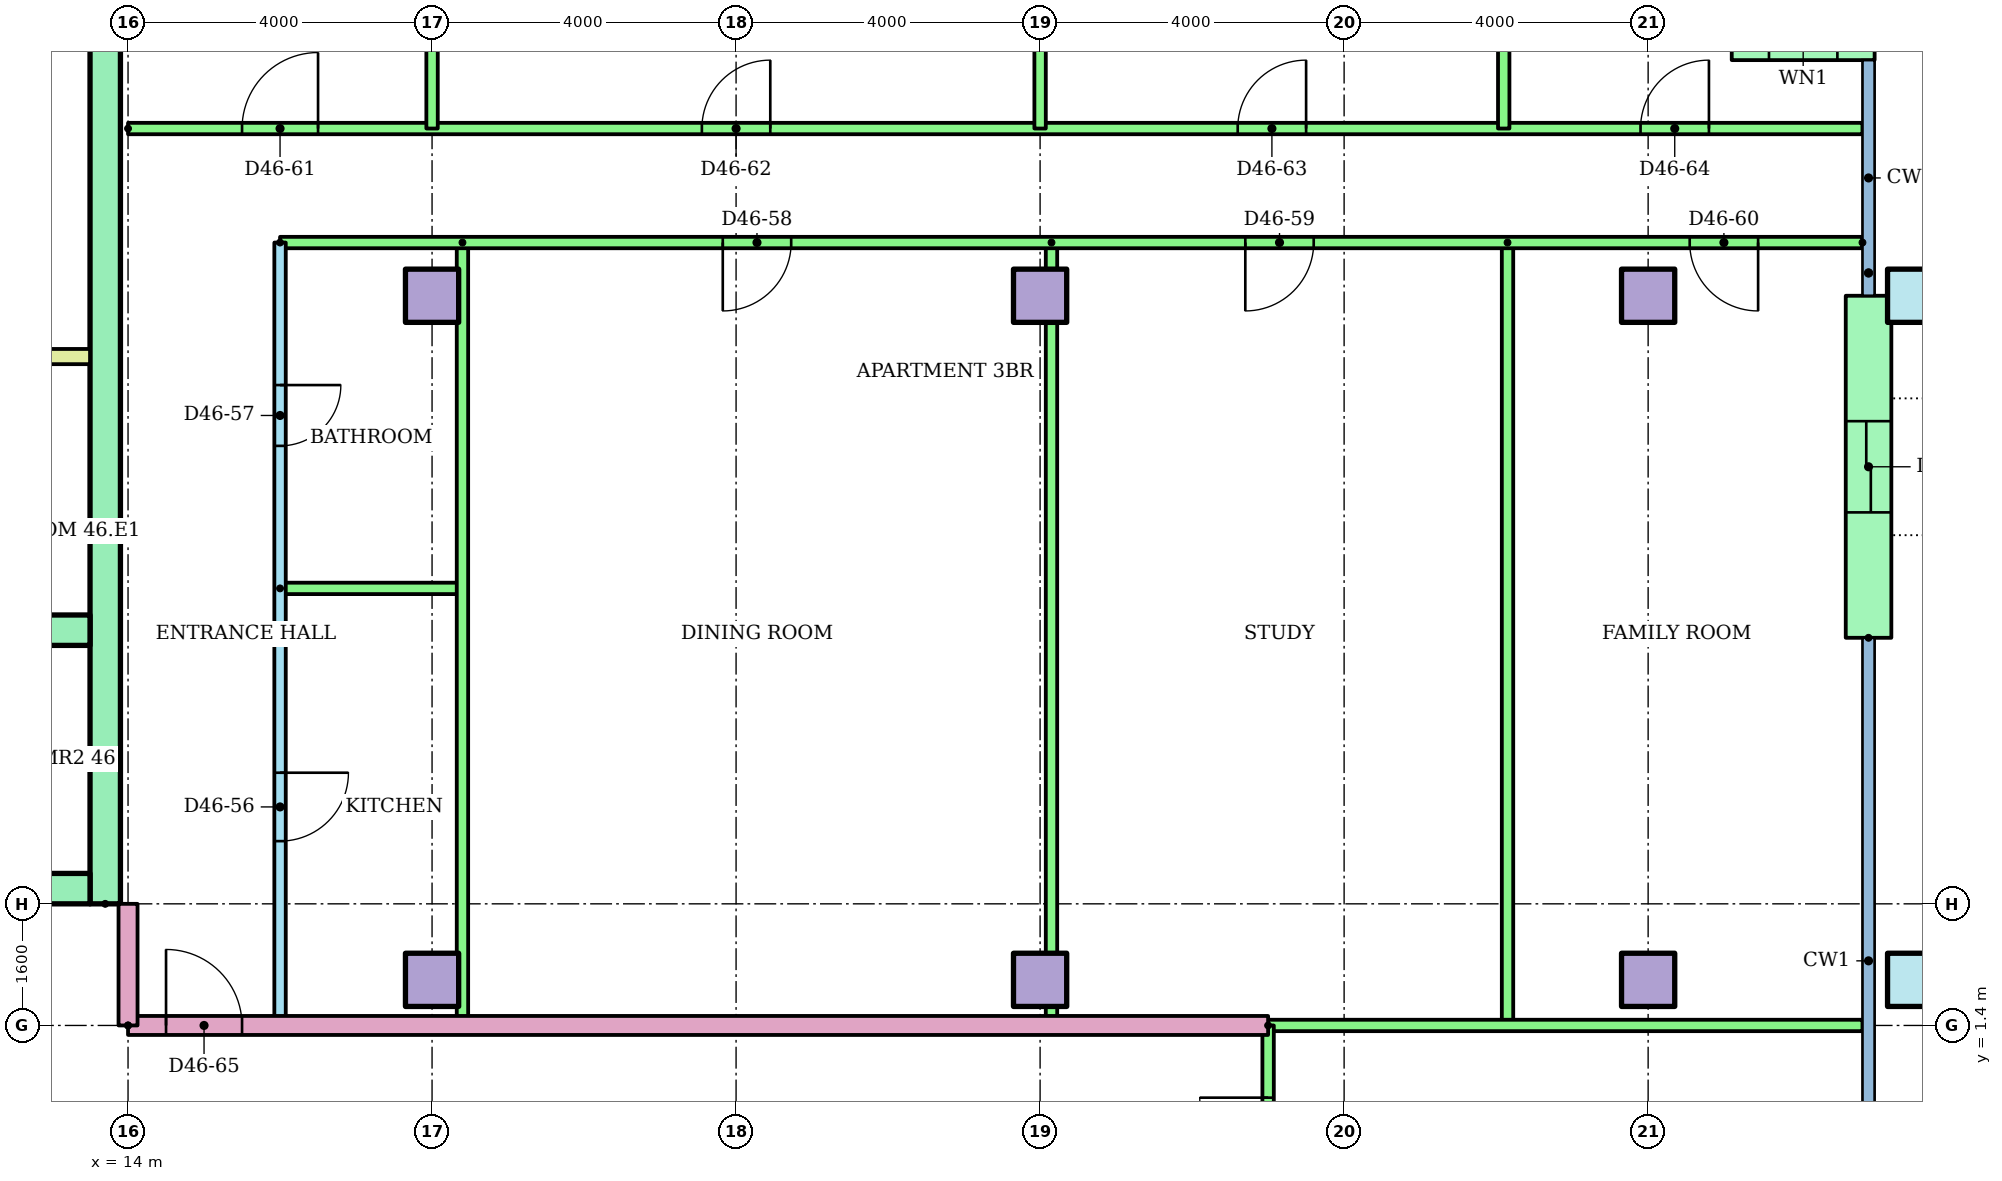
"""IFC4 building model, lengths in metres.
Left out: names, types, materials, properties, quantities, classifications, styles, units other than length and angle.
Written with IfcOpenShell. Run it as: python <this file> out.ifc"""

import sys

from ifc_helpers import new_model, si_unit, direction, frame, frame_2d, origin, origin_2d, place, context, subcontext, project, spatial, rectangle, hollow_rectangle, extrude, element, fill, save


model = new_model("IFC4")
c1 = context("Model", 3, precision=1e-05, world=origin(), true_north=direction((0.0, 1.0)))
c2 = subcontext(c1, "Body", "Model", "MODEL_VIEW")
j1 = project(units=[si_unit("LENGTHUNIT", "METRE"), si_unit("PLANEANGLEUNIT", "RADIAN")], contexts=[c1])
p1 = place(None, origin())
s1 = spatial("IfcSite", under=j1, at=p1, CompositionType="ELEMENT")
p2 = place(p1, origin())
s2 = spatial("IfcBuilding", under=s1, at=p2, CompositionType="ELEMENT")
p3 = place(p2, frame((0.0, 0.0, 178.1)))
s3 = spatial("IfcBuildingStorey", under=s2, at=p3, CompositionType="ELEMENT", Elevation=178.1)
for number, where in (
    (1, (18.0, 2.0, 0.0)),
    (2, (26.0, 2.0, 0.0)),
    (3, (34.0, 2.0, 0.0)),
):
    element("IfcColumn", number, at=place(p3, frame(where)), inside=s3, PredefinedType="COLUMN", context=c2, shape_type="SweptSolid", body=[
        extrude(rectangle(XDim=0.7, YDim=0.7, at=origin_2d()), origin(), (0.0, 0.0, 1.0), 3.2),
    ])
p4 = place(p3, frame((37.5, 2.0, 0.0)))
e4 = element("IfcColumn", 4, at=p4, inside=s3, PredefinedType="COLUMN", context=c2, shape_type="SweptSolid", body=[
    extrude(hollow_rectangle(XDim=0.7, YDim=0.7, WallThickness=0.036, at=origin_2d()), origin(), (0.0, 0.0, 1.0), 3.2),
])
for number, where in (
    (5, (18.0, 11.0, 0.0)),
    (6, (26.0, 11.0, 0.0)),
    (7, (34.0, 11.0, 0.0)),
):
    element("IfcColumn", number, at=place(p3, frame(where)), inside=s3, PredefinedType="COLUMN", context=c2, shape_type="SweptSolid", body=[
        extrude(rectangle(XDim=0.7, YDim=0.7, at=origin_2d()), origin(), (0.0, 0.0, 1.0), 3.2),
    ])
p5 = place(p3, frame((37.5, 11.0, 0.0)))
e8 = element("IfcColumn", 8, at=p5, inside=s3, PredefinedType="COLUMN", context=c2, shape_type="SweptSolid", body=[
    extrude(hollow_rectangle(XDim=0.7, YDim=0.7, WallThickness=0.036, at=origin_2d()), origin(), (0.0, 0.0, 1.0), 3.2),
])
p6 = place(p3, frame((36.98, 14.4, 0.0), z_axis=(0.0, 0.0, 1.0), x_axis=(-1.0, 0.0, 0.0)))
e9 = element("IfcWall", 9, at=p6, inside=s3, PredefinedType="STANDARD", context=c2, shape_type="SweptSolid", body=[
    extrude(rectangle(XDim=1.88, YDim=0.6, at=frame_2d((0.94, 0.0))), origin(), (0.0, 0.0, 1.0), 2.92),
])
p7 = place(p6, frame((0.49, 0.0, 0.9)))
e10 = element("IfcOpeningElement", 10, at=p7, cuts=e9, PredefinedType="OPENING", context=c2, shape_type="SweptSolid", body=[
    extrude(rectangle(XDim=0.9, YDim=1.5, at=frame_2d((0.45, 0.75))), frame((0.0, 0.31, 0.0), z_axis=(0.0, -1.0, 0.0), x_axis=(1.0, 0.0, 0.0)), (0.0, 0.0, 1.0), 0.62),
])
p8 = place(p3, frame((36.9, 6.5, 0.0), z_axis=(0.0, 0.0, 1.0), x_axis=(0.0, 1.0, 0.0)))
e11 = element("IfcWall", 11, at=p8, inside=s3, PredefinedType="STANDARD", context=c2, shape_type="SweptSolid", body=[
    extrude(rectangle(XDim=4.5, YDim=0.6, at=frame_2d((2.25, 0.0))), origin(), (0.0, 0.0, 1.0), 2.92),
])
p9 = place(p8, frame((1.65, 0.0, 0.0)))
e12 = element("IfcOpeningElement", 12, at=p9, cuts=e11, PredefinedType="OPENING", context=c2, shape_type="SweptSolid", body=[
    extrude(rectangle(XDim=1.2, YDim=2.1, at=frame_2d((0.6, 1.05))), frame((0.0, 0.31, 0.0), z_axis=(0.0, -1.0, 0.0), x_axis=(1.0, 0.0, 0.0)), (0.0, 0.0, 1.0), 0.62),
])
p10 = place(p3, frame((13.7, 3.0, 0.0), z_axis=(0.0, 0.0, 1.0), x_axis=(0.0, 1.0, 0.0)))
e13 = element("IfcWall", 13, at=p10, inside=s3, PredefinedType="SHEAR", context=c2, shape_type="SweptSolid", body=[
    extrude(rectangle(XDim=17.0, YDim=0.4, at=frame_2d((8.5, 0.0))), origin(), (0.0, 0.0, 1.0), 2.92),
])
p11 = place(p3, frame((-13.5, 3.2, 0.0)))
e14 = element("IfcWall", 14, at=p11, inside=s3, PredefinedType="SHEAR", context=c2, shape_type="SweptSolid", body=[
    extrude(rectangle(XDim=27.0, YDim=0.4, at=frame_2d((13.5, 0.0))), origin(), (0.0, 0.0, 1.0), 2.92),
])
p12 = place(p11, frame((22.083, 0.0, 0.0)))
e15 = element("IfcOpeningElement", 15, at=p12, cuts=e14, PredefinedType="OPENING", context=c2, shape_type="SweptSolid", body=[
    extrude(rectangle(XDim=1.1, YDim=2.1, at=frame_2d((0.55, 1.05))), frame((0.0, 0.21, 0.0), z_axis=(0.0, -1.0, 0.0), x_axis=(1.0, 0.0, 0.0)), (0.0, 0.0, 1.0), 0.42),
])
p13 = place(p11, frame((25.128, 0.0, 0.0)))
e16 = element("IfcOpeningElement", 16, at=p13, cuts=e14, PredefinedType="OPENING", context=c2, shape_type="SweptSolid", body=[
    extrude(rectangle(XDim=1.1, YDim=2.1, at=frame_2d((0.55, 1.05))), frame((0.0, 0.21, 0.0), z_axis=(0.0, -1.0, 0.0), x_axis=(1.0, 0.0, 0.0)), (0.0, 0.0, 1.0), 0.42),
])
p14 = place(p11, frame((12.6, 0.0, 0.0)))
e17 = element("IfcOpeningElement", 17, at=p14, cuts=e14, PredefinedType="OPENING", context=c2, shape_type="SweptSolid", body=[
    extrude(rectangle(XDim=1.8, YDim=2.1, at=frame_2d((0.9, 1.05))), frame((0.0, 0.21, 0.0), z_axis=(0.0, -1.0, 0.0), x_axis=(1.0, 0.0, 0.0)), (0.0, 0.0, 1.0), 0.42),
])
p15 = place(p3, frame((1.522, 6.6, 0.0)))
e18 = element("IfcWall", 18, at=p15, inside=s3, PredefinedType="SHEAR", context=c2, shape_type="SweptSolid", body=[
    extrude(rectangle(XDim=11.978, YDim=0.4, at=frame_2d((5.989, 0.0))), origin(), (0.0, 0.0, 1.0), 2.92),
])
p16 = place(p15, frame((1.022, 0.0, 0.0)))
e19 = element("IfcOpeningElement", 19, at=p16, cuts=e18, PredefinedType="OPENING", context=c2, shape_type="SweptSolid", body=[
    extrude(rectangle(XDim=1.0, YDim=2.1, at=frame_2d((0.5, 1.05))), frame((0.0, 0.21, 0.0), z_axis=(0.0, -1.0, 0.0), x_axis=(1.0, 0.0, 0.0)), (0.0, 0.0, 1.0), 0.42),
])
p17 = place(p15, frame((4.067, 0.0, 0.0)))
e20 = element("IfcOpeningElement", 20, at=p17, cuts=e18, PredefinedType="OPENING", context=c2, shape_type="SweptSolid", body=[
    extrude(rectangle(XDim=1.0, YDim=2.1, at=frame_2d((0.5, 1.05))), frame((0.0, 0.21, 0.0), z_axis=(0.0, -1.0, 0.0), x_axis=(1.0, 0.0, 0.0)), (0.0, 0.0, 1.0), 0.42),
])
p18 = place(p3, frame((9.6, 10.2, 0.0)))
e21 = element("IfcWall", 21, at=p18, inside=s3, PredefinedType="PARTITIONING", context=c2, shape_type="SweptSolid", body=[
    extrude(rectangle(XDim=3.9, YDim=0.2, at=frame_2d((1.95, 0.0))), origin(), (0.0, 0.0, 1.0), 2.92),
])
p19 = place(p3, frame((16.0, 11.7, 0.0), z_axis=(0.0, 0.0, 1.0), x_axis=(0.0, -1.0, 0.0)))
e22 = element("IfcWall", 22, at=p19, inside=s3, PredefinedType="PARTITIONING", context=c2, shape_type="SweptSolid", body=[
    extrude(rectangle(XDim=10.3, YDim=0.15, at=frame_2d((5.15, 0.0))), origin(), (0.0, 0.0, 1.0), 2.4),
])
p20 = place(p19, frame((6.975, 0.0, 0.0)))
e23 = element("IfcOpeningElement", 23, at=p20, cuts=e22, PredefinedType="OPENING", context=c2, shape_type="SweptSolid", body=[
    extrude(rectangle(XDim=0.9, YDim=2.1, at=frame_2d((0.45, 1.05))), frame((0.0, 0.085, 0.0), z_axis=(0.0, -1.0, 0.0), x_axis=(1.0, 0.0, 0.0)), (0.0, 0.0, 1.0), 0.17),
])
p21 = place(p19, frame((1.875, 0.0, 0.0)))
e24 = element("IfcOpeningElement", 24, at=p21, cuts=e22, PredefinedType="OPENING", context=c2, shape_type="SweptSolid", body=[
    extrude(rectangle(XDim=0.8, YDim=2.1, at=frame_2d((0.4, 1.05))), frame((0.0, 0.085, 0.0), z_axis=(0.0, -1.0, 0.0), x_axis=(1.0, 0.0, 0.0)), (0.0, 0.0, 1.0), 0.17),
])
p22 = place(p3, frame((16.0, 7.15, 0.0)))
e25 = element("IfcWall", 25, at=p22, inside=s3, PredefinedType="PARTITIONING", context=c2, shape_type="SweptSolid", body=[
    extrude(rectangle(XDim=2.4, YDim=0.15, at=frame_2d((1.2, 0.0))), origin(), (0.0, 0.0, 1.0), 2.4),
])
for number, where, z_axis, x_axis in (
    (26, (18.4, 11.7, 0.0), (0.0, 0.0, 1.0), (0.0, -1.0, 0.0)),
    (27, (26.15, 11.7, 0.0), (0.0, 0.0, 1.0), (0.0, -1.0, 0.0)),
    (28, (32.15, 11.7, 0.0), (0.0, 0.0, 1.0), (0.0, -1.0, 0.0)),
):
    element("IfcWall", number, at=place(p3, frame(where, z_axis=z_axis, x_axis=x_axis)), inside=s3, PredefinedType="PARTITIONING", context=c2, shape_type="SweptSolid", body=[
        extrude(rectangle(XDim=10.3, YDim=0.15, at=frame_2d((5.15, 0.0))), origin(), (0.0, 0.0, 1.0), 2.4),
    ])
p23 = place(p3, frame((36.82, 11.7, 0.0), z_axis=(0.0, 0.0, 1.0), x_axis=(-1.0, 0.0, 0.0)))
e29 = element("IfcWall", 29, at=p23, inside=s3, PredefinedType="PARTITIONING", context=c2, shape_type="SweptSolid", body=[
    extrude(rectangle(XDim=20.82, YDim=0.15, at=frame_2d((10.41, 0.0))), origin(), (0.0, 0.0, 1.0), 2.4),
])
p24 = place(p23, frame((14.095, 0.0, 0.0)))
e30 = element("IfcOpeningElement", 30, at=p24, cuts=e29, PredefinedType="OPENING", context=c2, shape_type="SweptSolid", body=[
    extrude(rectangle(XDim=0.9, YDim=2.1, at=frame_2d((0.45, 1.05))), frame((0.0, 0.085, 0.0), z_axis=(0.0, -1.0, 0.0), x_axis=(1.0, 0.0, 0.0)), (0.0, 0.0, 1.0), 0.17),
])
p25 = place(p23, frame((7.22, 0.0, 0.0)))
e31 = element("IfcOpeningElement", 31, at=p25, cuts=e29, PredefinedType="OPENING", context=c2, shape_type="SweptSolid", body=[
    extrude(rectangle(XDim=0.9, YDim=2.1, at=frame_2d((0.45, 1.05))), frame((0.0, 0.085, 0.0), z_axis=(0.0, -1.0, 0.0), x_axis=(1.0, 0.0, 0.0)), (0.0, 0.0, 1.0), 0.17),
])
p26 = place(p23, frame((1.373, 0.0, 0.0)))
e32 = element("IfcOpeningElement", 32, at=p26, cuts=e29, PredefinedType="OPENING", context=c2, shape_type="SweptSolid", body=[
    extrude(rectangle(XDim=0.9, YDim=2.1, at=frame_2d((0.45, 1.05))), frame((0.0, 0.085, 0.0), z_axis=(0.0, -1.0, 0.0), x_axis=(1.0, 0.0, 0.0)), (0.0, 0.0, 1.0), 0.17),
])
p27 = place(p3, frame((14.0, 13.2, 0.0)))
e33 = element("IfcWall", 33, at=p27, inside=s3, PredefinedType="PARTITIONING", context=c2, shape_type="SweptSolid", body=[
    extrude(rectangle(XDim=22.82, YDim=0.15, at=frame_2d((11.41, 0.0))), origin(), (0.0, 0.0, 1.0), 2.4),
])
p28 = place(p27, frame((1.5, 0.0, 0.0)))
e34 = element("IfcOpeningElement", 34, at=p28, cuts=e33, PredefinedType="OPENING", context=c2, shape_type="SweptSolid", body=[
    extrude(rectangle(XDim=1.0, YDim=2.1, at=frame_2d((0.5, 1.05))), frame((0.0, 0.085, 0.0), z_axis=(0.0, -1.0, 0.0), x_axis=(1.0, 0.0, 0.0)), (0.0, 0.0, 1.0), 0.17),
])
p29 = place(p27, frame((7.55, 0.0, 0.0)))
e35 = element("IfcOpeningElement", 35, at=p29, cuts=e33, PredefinedType="OPENING", context=c2, shape_type="SweptSolid", body=[
    extrude(rectangle(XDim=0.9, YDim=2.1, at=frame_2d((0.45, 1.05))), frame((0.0, 0.085, 0.0), z_axis=(0.0, -1.0, 0.0), x_axis=(1.0, 0.0, 0.0)), (0.0, 0.0, 1.0), 0.17),
])
p30 = place(p27, frame((14.6, 0.0, 0.0)))
e36 = element("IfcOpeningElement", 36, at=p30, cuts=e33, PredefinedType="OPENING", context=c2, shape_type="SweptSolid", body=[
    extrude(rectangle(XDim=0.9, YDim=2.1, at=frame_2d((0.45, 1.05))), frame((0.0, 0.085, 0.0), z_axis=(0.0, -1.0, 0.0), x_axis=(1.0, 0.0, 0.0)), (0.0, 0.0, 1.0), 0.17),
])
p31 = place(p27, frame((19.9, 0.0, 0.0)))
e37 = element("IfcOpeningElement", 37, at=p31, cuts=e33, PredefinedType="OPENING", context=c2, shape_type="SweptSolid", body=[
    extrude(rectangle(XDim=0.9, YDim=2.1, at=frame_2d((0.45, 1.05))), frame((0.0, 0.085, 0.0), z_axis=(0.0, -1.0, 0.0), x_axis=(1.0, 0.0, 0.0)), (0.0, 0.0, 1.0), 0.17),
])
for number, where, z_axis, x_axis in (
    (38, (18.0, 18.821, 0.0), (0.0, 0.0, 1.0), (0.0, -1.0, 0.0)),
    (39, (26.0, 18.821, 0.0), (0.0, 0.0, 1.0), (0.0, -1.0, 0.0)),
):
    element("IfcWall", number, at=place(p3, frame(where, z_axis=z_axis, x_axis=x_axis)), inside=s3, PredefinedType="PARTITIONING", context=c2, shape_type="SweptSolid", body=[
        extrude(rectangle(XDim=5.621, YDim=0.15, at=frame_2d((2.811, 0.0))), origin(), (0.0, 0.0, 1.0), 2.4),
    ])
p32 = place(p3, frame((32.1, 17.02, 0.0), z_axis=(0.0, 0.0, 1.0), x_axis=(0.0, -1.0, 0.0)))
e40 = element("IfcWall", 40, at=p32, inside=s3, PredefinedType="PARTITIONING", context=c2, shape_type="SweptSolid", body=[
    extrude(rectangle(XDim=3.82, YDim=0.15, at=frame_2d((1.91, 0.0))), origin(), (0.0, 0.0, 1.0), 2.4),
])
p33 = place(p3, frame((14.0, 1.4, 0.0)))
e41 = element("IfcWall", 41, at=p33, inside=s3, PredefinedType="PARTITIONING", context=c2, shape_type="SweptSolid", body=[
    extrude(rectangle(XDim=15.0, YDim=0.25, at=frame_2d((7.5, 0.0))), origin(), (0.0, 0.0, 1.0), 2.4),
])
p34 = place(p33, frame((0.5, 0.0, 0.0)))
e42 = element("IfcOpeningElement", 42, at=p34, cuts=e41, PredefinedType="OPENING", context=c2, shape_type="SweptSolid", body=[
    extrude(rectangle(XDim=1.0, YDim=2.1, at=frame_2d((0.5, 1.05))), frame((0.0, 0.135, 0.0), z_axis=(0.0, -1.0, 0.0), x_axis=(1.0, 0.0, 0.0)), (0.0, 0.0, 1.0), 0.27),
])
p35 = place(p3, frame((29.0, 1.4, 0.0)))
e43 = element("IfcWall", 43, at=p35, inside=s3, PredefinedType="PARTITIONING", context=c2, shape_type="SweptSolid", body=[
    extrude(rectangle(XDim=7.82, YDim=0.15, at=frame_2d((3.91, 0.0))), origin(), (0.0, 0.0, 1.0), 2.4),
])
p36 = place(p3, frame((29.0, -1.4, 0.0), z_axis=(0.0, 0.0, 1.0), x_axis=(0.0, 1.0, 0.0)))
e44 = element("IfcWall", 44, at=p36, inside=s3, PredefinedType="PARTITIONING", context=c2, shape_type="SweptSolid", body=[
    extrude(rectangle(XDim=2.8, YDim=0.15, at=frame_2d((1.4, 0.0))), origin(), (0.0, 0.0, 1.0), 2.4),
])
p37 = place(p36, frame((0.95, 0.0, 0.0)))
e45 = element("IfcOpeningElement", 45, at=p37, cuts=e44, PredefinedType="OPENING", context=c2, shape_type="SweptSolid", body=[
    extrude(rectangle(XDim=0.9, YDim=2.1, at=frame_2d((0.45, 1.05))), frame((0.0, 0.085, 0.0), z_axis=(0.0, -1.0, 0.0), x_axis=(1.0, 0.0, 0.0)), (0.0, 0.0, 1.0), 0.17),
])
p38 = place(p3, frame((14.0, 1.4, 0.0), z_axis=(0.0, 0.0, 1.0), x_axis=(0.0, 1.0, 0.0)))
e46 = element("IfcWall", 46, at=p38, inside=s3, PredefinedType="PARTITIONING", context=c2, shape_type="SweptSolid", body=[
    extrude(rectangle(XDim=1.6, YDim=0.25, at=frame_2d((0.8, 0.0))), origin(), (0.0, 0.0, 1.0), 2.4),
])
p39 = place(p20, origin())
e47 = element("IfcDoor", 47, at=p39, inside=s3, OperationType="SINGLE_SWING_LEFT", PredefinedType="DOOR", context=c2, shape_type="SweptSolid", body=[
    extrude(rectangle(XDim=0.9, YDim=2.1, at=frame_2d((0.45, 1.05))), frame((0.0, 0.025, 0.0), z_axis=(0.0, -1.0, 0.0), x_axis=(1.0, 0.0, 0.0)), (0.0, 0.0, 1.0), 0.05),
])
fill(e23, e47)
p40 = place(p21, origin())
e48 = element("IfcDoor", 48, at=p40, inside=s3, OperationType="SINGLE_SWING_LEFT", PredefinedType="DOOR", context=c2, shape_type="SweptSolid", body=[
    extrude(rectangle(XDim=0.8, YDim=2.1, at=frame_2d((0.4, 1.05))), frame((0.0, 0.025, 0.0), z_axis=(0.0, -1.0, 0.0), x_axis=(1.0, 0.0, 0.0)), (0.0, 0.0, 1.0), 0.05),
])
fill(e24, e48)
p41 = place(p24, origin())
e49 = element("IfcDoor", 49, at=p41, inside=s3, OperationType="SINGLE_SWING_RIGHT", PredefinedType="DOOR", context=c2, shape_type="SweptSolid", body=[
    extrude(rectangle(XDim=0.9, YDim=2.1, at=frame_2d((0.45, 1.05))), frame((0.0, 0.025, 0.0), z_axis=(0.0, -1.0, 0.0), x_axis=(1.0, 0.0, 0.0)), (0.0, 0.0, 1.0), 0.05),
])
fill(e30, e49)
p42 = place(p25, origin())
e50 = element("IfcDoor", 50, at=p42, inside=s3, OperationType="SINGLE_SWING_RIGHT", PredefinedType="DOOR", context=c2, shape_type="SweptSolid", body=[
    extrude(rectangle(XDim=0.9, YDim=2.1, at=frame_2d((0.45, 1.05))), frame((0.0, 0.025, 0.0), z_axis=(0.0, -1.0, 0.0), x_axis=(1.0, 0.0, 0.0)), (0.0, 0.0, 1.0), 0.05),
])
fill(e31, e50)
p43 = place(p26, origin())
e51 = element("IfcDoor", 51, at=p43, inside=s3, OperationType="SINGLE_SWING_LEFT", PredefinedType="DOOR", context=c2, shape_type="SweptSolid", body=[
    extrude(rectangle(XDim=0.9, YDim=2.1, at=frame_2d((0.45, 1.05))), frame((0.0, 0.025, 0.0), z_axis=(0.0, -1.0, 0.0), x_axis=(1.0, 0.0, 0.0)), (0.0, 0.0, 1.0), 0.05),
])
fill(e32, e51)
p44 = place(p28, origin())
e52 = element("IfcDoor", 52, at=p44, inside=s3, OperationType="SINGLE_SWING_RIGHT", PredefinedType="DOOR", context=c2, shape_type="SweptSolid", body=[
    extrude(rectangle(XDim=1.0, YDim=2.1, at=frame_2d((0.5, 1.05))), frame((0.0, 0.025, 0.0), z_axis=(0.0, -1.0, 0.0), x_axis=(1.0, 0.0, 0.0)), (0.0, 0.0, 1.0), 0.05),
])
fill(e34, e52)
p45 = place(p29, origin())
e53 = element("IfcDoor", 53, at=p45, inside=s3, OperationType="SINGLE_SWING_RIGHT", PredefinedType="DOOR", context=c2, shape_type="SweptSolid", body=[
    extrude(rectangle(XDim=0.9, YDim=2.1, at=frame_2d((0.45, 1.05))), frame((0.0, 0.025, 0.0), z_axis=(0.0, -1.0, 0.0), x_axis=(1.0, 0.0, 0.0)), (0.0, 0.0, 1.0), 0.05),
])
fill(e35, e53)
p46 = place(p30, origin())
e54 = element("IfcDoor", 54, at=p46, inside=s3, OperationType="SINGLE_SWING_RIGHT", PredefinedType="DOOR", context=c2, shape_type="SweptSolid", body=[
    extrude(rectangle(XDim=0.9, YDim=2.1, at=frame_2d((0.45, 1.05))), frame((0.0, 0.025, 0.0), z_axis=(0.0, -1.0, 0.0), x_axis=(1.0, 0.0, 0.0)), (0.0, 0.0, 1.0), 0.05),
])
fill(e36, e54)
p47 = place(p31, origin())
e55 = element("IfcDoor", 55, at=p47, inside=s3, OperationType="SINGLE_SWING_RIGHT", PredefinedType="DOOR", context=c2, shape_type="SweptSolid", body=[
    extrude(rectangle(XDim=0.9, YDim=2.1, at=frame_2d((0.45, 1.05))), frame((0.0, 0.025, 0.0), z_axis=(0.0, -1.0, 0.0), x_axis=(1.0, 0.0, 0.0)), (0.0, 0.0, 1.0), 0.05),
])
fill(e37, e55)
p48 = place(p34, origin())
e56 = element("IfcDoor", 56, at=p48, inside=s3, OperationType="SINGLE_SWING_LEFT", PredefinedType="DOOR", context=c2, shape_type="SweptSolid", body=[
    extrude(rectangle(XDim=1.0, YDim=2.1, at=frame_2d((0.5, 1.05))), frame((0.0, 0.025, 0.0), z_axis=(0.0, -1.0, 0.0), x_axis=(1.0, 0.0, 0.0)), (0.0, 0.0, 1.0), 0.05),
])
fill(e42, e56)
p49 = place(p37, origin())
e57 = element("IfcDoor", 57, at=p49, inside=s3, OperationType="SINGLE_SWING_RIGHT", PredefinedType="DOOR", context=c2, shape_type="SweptSolid", body=[
    extrude(rectangle(XDim=0.9, YDim=2.1, at=frame_2d((0.45, 1.05))), frame((0.0, 0.025, 0.0), z_axis=(0.0, -1.0, 0.0), x_axis=(1.0, 0.0, 0.0)), (0.0, 0.0, 1.0), 0.05),
])
fill(e45, e57)
p50 = place(p9, origin())
e58 = element("IfcDoor", 58, at=p50, inside=s3, OperationType="SLIDING_TO_LEFT", PredefinedType="DOOR", context=c2, shape_type="SweptSolid", body=[
    extrude(rectangle(XDim=1.2, YDim=2.1, at=frame_2d((0.6, 1.05))), frame((0.0, 0.025, 0.0), z_axis=(0.0, -1.0, 0.0), x_axis=(1.0, 0.0, 0.0)), (0.0, 0.0, 1.0), 0.05),
])
fill(e12, e58)
save(model, sys.argv[1])
